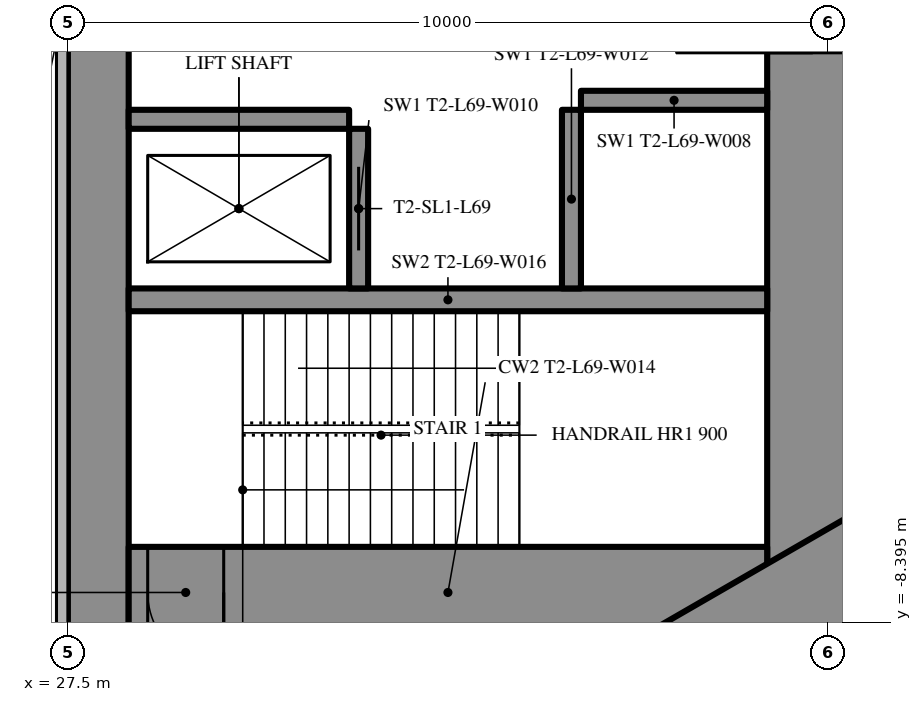
"""IFC4 building model, lengths in metres.
Left out: names, types, materials, properties, quantities, classifications, styles, units other than length and angle.
Written with IfcOpenShell. Run it as: python <this file> out.ifc"""

import sys

from ifc_helpers import new_model, si_unit, direction, frame, frame_2d, origin, place, context, subcontext, project, spatial, rectangle, extrude, element, fill, save


model = new_model("IFC4")
c1 = context("Model", 3, precision=1e-05, world=origin(), true_north=direction((0.0, 1.0)))
c2 = subcontext(c1, "Body", "Model", "MODEL_VIEW")
j1 = project(units=[si_unit("LENGTHUNIT", "METRE"), si_unit("PLANEANGLEUNIT", "RADIAN")], contexts=[c1])
p1 = place(None, origin())
s1 = spatial("IfcSite", under=j1, at=p1, CompositionType="ELEMENT")
p2 = place(p1, origin())
s2 = spatial("IfcBuilding", under=s1, at=p2, CompositionType="ELEMENT")
p3 = place(p2, frame((0.0, 0.0, 263.3)))
s3 = spatial("IfcBuildingStorey", under=s2, at=p3, CompositionType="ELEMENT", Elevation=263.3)
p4 = place(p3, frame((27.9, -8.6, 0.0), z_axis=(0.0, 0.0, 1.0), x_axis=(0.0, 1.0, 0.0)))
e1 = element("IfcWall", 1, at=p4, inside=s3, PredefinedType="SHEAR", context=c2, shape_type="SweptSolid", body=[
    extrude(rectangle(XDim=17.2, YDim=0.8, at=frame_2d((8.6, 0.0))), origin(), (0.0, 0.0, 1.0), 5.0),
])
p5 = place(p4, frame((9.35, 0.0, 0.0)))
e2 = element("IfcOpeningElement", 2, at=p5, cuts=e1, PredefinedType="OPENING", context=c2, shape_type="SweptSolid", body=[
    extrude(rectangle(XDim=0.9, YDim=2.2, at=frame_2d((0.45, 1.1))), frame((0.0, 0.41, 0.0), z_axis=(0.0, -1.0, 0.0), x_axis=(1.0, 0.0, 0.0)), (0.0, 0.0, 1.0), 0.82),
])
p6 = place(p3, frame((37.3, -8.6, 0.0), z_axis=(0.0, 0.0, 1.0), x_axis=(0.0, 1.0, 0.0)))
e3 = element("IfcWall", 3, at=p6, inside=s3, PredefinedType="SHEAR", context=c2, shape_type="SweptSolid", body=[
    extrude(rectangle(XDim=17.2, YDim=1.2, at=frame_2d((8.6, 0.0))), origin(), (0.0, 0.0, 1.0), 5.0),
])
p7 = place(p6, frame((7.7, 0.0, 0.0)))
e4 = element("IfcOpeningElement", 4, at=p7, cuts=e3, PredefinedType="OPENING", context=c2, shape_type="SweptSolid", body=[
    extrude(rectangle(XDim=1.8, YDim=2.2, at=frame_2d((0.9, 1.1))), frame((0.0, 0.61, 0.0), z_axis=(0.0, -1.0, 0.0), x_axis=(1.0, 0.0, 0.0)), (0.0, 0.0, 1.0), 1.22),
])
p8 = place(p3, frame((28.3, -8.0, 0.0), z_axis=(0.0, 0.0, 1.0), x_axis=(1.0, 0.0, 0.0)))
e5 = element("IfcWall", 5, at=p8, inside=s3, PredefinedType="SHEAR", context=c2, shape_type="SweptSolid", body=[
    extrude(rectangle(XDim=8.4, YDim=1.2, at=frame_2d((4.2, 0.0))), origin(), (0.0, 0.0, 1.0), 5.0),
])
p9 = place(p8, frame((0.25, 0.0, 0.0)))
e6 = element("IfcOpeningElement", 6, at=p9, cuts=e5, PredefinedType="OPENING", context=c2, shape_type="SweptSolid", body=[
    extrude(rectangle(XDim=1.0, YDim=2.2, at=frame_2d((0.5, 1.1))), frame((0.0, 0.61, 0.0), z_axis=(0.0, -1.0, 0.0), x_axis=(1.0, 0.0, 0.0)), (0.0, 0.0, 1.0), 1.22),
])
p10 = place(p3, frame((28.3, -4.15, 0.0), z_axis=(0.0, 0.0, 1.0), x_axis=(1.0, 0.0, 0.0)))
e7 = element("IfcWall", 7, at=p10, inside=s3, PredefinedType="SHEAR", context=c2, shape_type="SweptSolid", body=[
    extrude(rectangle(XDim=8.4, YDim=0.3, at=frame_2d((4.2, 0.0))), origin(), (0.0, 0.0, 1.0), 5.0),
])
p11 = place(p3, frame((31.325, -4.0, 0.0), z_axis=(0.0, 0.0, 1.0), x_axis=(0.0, 1.0, 0.0)))
e8 = element("IfcWall", 8, at=p11, inside=s3, PredefinedType="SHEAR", context=c2, shape_type="SweptSolid", body=[
    extrude(rectangle(XDim=2.1, YDim=0.25, at=frame_2d((1.05, 0.0))), origin(), (0.0, 0.0, 1.0), 5.0),
])
p12 = place(p11, frame((0.5, 0.0, 0.0)))
e9 = element("IfcOpeningElement", 9, at=p12, cuts=e8, PredefinedType="OPENING", context=c2, shape_type="SweptSolid", body=[
    extrude(rectangle(XDim=1.1, YDim=2.2, at=frame_2d((0.55, 1.1))), frame((0.0, 0.135, 0.0), z_axis=(0.0, -1.0, 0.0), x_axis=(1.0, 0.0, 0.0)), (0.0, 0.0, 1.0), 0.27),
])
p13 = place(p3, frame((34.125, -4.0, 0.0), z_axis=(0.0, 0.0, 1.0), x_axis=(0.0, 1.0, 0.0)))
e10 = element("IfcWall", 10, at=p13, inside=s3, PredefinedType="SHEAR", context=c2, shape_type="SweptSolid", body=[
    extrude(rectangle(XDim=2.35, YDim=0.25, at=frame_2d((1.175, 0.0))), origin(), (0.0, 0.0, 1.0), 5.0),
])
p14 = place(p3, frame((28.3, -1.775, 0.0), z_axis=(0.0, 0.0, 1.0), x_axis=(1.0, 0.0, 0.0)))
e11 = element("IfcWall", 11, at=p14, inside=s3, PredefinedType="SHEAR", context=c2, shape_type="SweptSolid", body=[
    extrude(rectangle(XDim=2.9, YDim=0.25, at=frame_2d((1.45, 0.0))), origin(), (0.0, 0.0, 1.0), 5.0),
])
p15 = place(p3, frame((34.25, -1.525, 0.0), z_axis=(0.0, 0.0, 1.0), x_axis=(1.0, 0.0, 0.0)))
e12 = element("IfcWall", 12, at=p15, inside=s3, PredefinedType="SHEAR", context=c2, shape_type="SweptSolid", body=[
    extrude(rectangle(XDim=2.45, YDim=0.25, at=frame_2d((1.225, 0.0))), origin(), (0.0, 0.0, 1.0), 5.0),
])
p16 = place(p3, frame((27.2, -13.8, 0.0), z_axis=(0.0, 0.0, 1.0), x_axis=(0.866027159892, 0.499996958321, 0.0)))
e13 = element("IfcWall", 13, at=p16, inside=s3, PredefinedType="SHEAR", context=c2, shape_type="SweptSolid", body=[
    extrude(rectangle(XDim=27.947, YDim=1.2, at=frame_2d((13.973, 0.0))), origin(), (0.0, 0.0, 1.0), 5.0),
])
p17 = place(p16, frame((4.6, 0.0, 0.0)))
e14 = element("IfcOpeningElement", 14, at=p17, cuts=e13, PredefinedType="OPENING", context=c2, shape_type="SweptSolid", body=[
    extrude(rectangle(XDim=1.0, YDim=2.2, at=frame_2d((0.5, 1.1))), frame((0.0, 0.61, 0.0), z_axis=(0.0, -1.0, 0.0), x_axis=(1.0, 0.0, 0.0)), (0.0, 0.0, 1.0), 1.22),
])
p18 = place(p16, frame((13.395, 0.0, 0.0)))
e15 = element("IfcOpeningElement", 15, at=p18, cuts=e13, PredefinedType="OPENING", context=c2, shape_type="SweptSolid", body=[
    extrude(rectangle(XDim=1.8, YDim=2.2, at=frame_2d((0.9, 1.1))), frame((0.0, 0.61, 0.0), z_axis=(0.0, -1.0, 0.0), x_axis=(1.0, 0.0, 0.0)), (0.0, 0.0, 1.0), 1.22),
])
p19 = place(p3, frame((28.959, -15.44, 0.0), z_axis=(0.0, 0.0, 1.0), x_axis=(0.866025227435, 0.500000305447, 0.0)))
e16 = element("IfcWall", 16, at=p19, inside=s3, PredefinedType="PARTITIONING", context=c2, shape_type="SweptSolid", body=[
    extrude(rectangle(XDim=30.88, YDim=0.2, at=frame_2d((15.44, 0.0))), origin(), (0.0, 0.0, 1.0), 4.75),
])
p20 = place(p19, frame((6.994, 0.0, 0.0)))
e17 = element("IfcOpeningElement", 17, at=p20, cuts=e16, PredefinedType="OPENING", context=c2, shape_type="SweptSolid", body=[
    extrude(rectangle(XDim=2.0, YDim=2.4, at=frame_2d((1.0, 1.2))), frame((0.0, 0.11, 0.0), z_axis=(0.0, -1.0, 0.0), x_axis=(1.0, 0.0, 0.0)), (0.0, 0.0, 1.0), 0.22),
])
p21 = place(p19, frame((16.704, 0.0, 0.0)))
e18 = element("IfcOpeningElement", 18, at=p21, cuts=e16, PredefinedType="OPENING", context=c2, shape_type="SweptSolid", body=[
    extrude(rectangle(XDim=2.0, YDim=2.4, at=frame_2d((1.0, 1.2))), frame((0.0, 0.11, 0.0), z_axis=(0.0, -1.0, 0.0), x_axis=(1.0, 0.0, 0.0)), (0.0, 0.0, 1.0), 0.22),
])
p22 = place(p19, frame((20.587, 0.0, 0.0)))
e19 = element("IfcOpeningElement", 19, at=p22, cuts=e16, PredefinedType="OPENING", context=c2, shape_type="SweptSolid", body=[
    extrude(rectangle(XDim=2.0, YDim=2.4, at=frame_2d((1.0, 1.2))), frame((0.0, 0.11, 0.0), z_axis=(0.0, -1.0, 0.0), x_axis=(1.0, 0.0, 0.0)), (0.0, 0.0, 1.0), 0.22),
])
p23 = place(p19, frame((26.092, 0.0, 0.0)))
e20 = element("IfcOpeningElement", 20, at=p23, cuts=e16, PredefinedType="OPENING", context=c2, shape_type="SweptSolid", body=[
    extrude(rectangle(XDim=2.0, YDim=2.4, at=frame_2d((1.0, 1.2))), frame((0.0, 0.11, 0.0), z_axis=(0.0, -1.0, 0.0), x_axis=(1.0, 0.0, 0.0)), (0.0, 0.0, 1.0), 0.22),
])
p24 = place(p7, origin())
e21 = element("IfcDoor", 21, at=p24, inside=s3, OperationType="DOUBLE_DOOR_SINGLE_SWING", PredefinedType="DOOR", context=c2, shape_type="SweptSolid", body=[
    extrude(rectangle(XDim=1.8, YDim=2.2, at=frame_2d((0.9, 1.1))), frame((0.0, 0.025, 0.0), z_axis=(0.0, -1.0, 0.0), x_axis=(1.0, 0.0, 0.0)), (0.0, 0.0, 1.0), 0.05),
])
fill(e4, e21)
p25 = place(p9, origin())
e22 = element("IfcDoor", 22, at=p25, inside=s3, OperationType="SINGLE_SWING_RIGHT", PredefinedType="DOOR", context=c2, shape_type="SweptSolid", body=[
    extrude(rectangle(XDim=1.0, YDim=2.2, at=frame_2d((0.5, 1.1))), frame((0.0, 0.025, 0.0), z_axis=(0.0, -1.0, 0.0), x_axis=(1.0, 0.0, 0.0)), (0.0, 0.0, 1.0), 0.05),
])
fill(e6, e22)
p26 = place(p12, origin())
e23 = element("IfcDoor", 23, at=p26, inside=s3, OperationType="SLIDING_TO_LEFT", PredefinedType="USERDEFINED", context=c2, shape_type="SweptSolid", body=[
    extrude(rectangle(XDim=1.1, YDim=2.2, at=frame_2d((0.55, 1.1))), frame((0.0, 0.025, 0.0), z_axis=(0.0, -1.0, 0.0), x_axis=(1.0, 0.0, 0.0)), (0.0, 0.0, 1.0), 0.05),
])
fill(e9, e23)
save(model, sys.argv[1])
